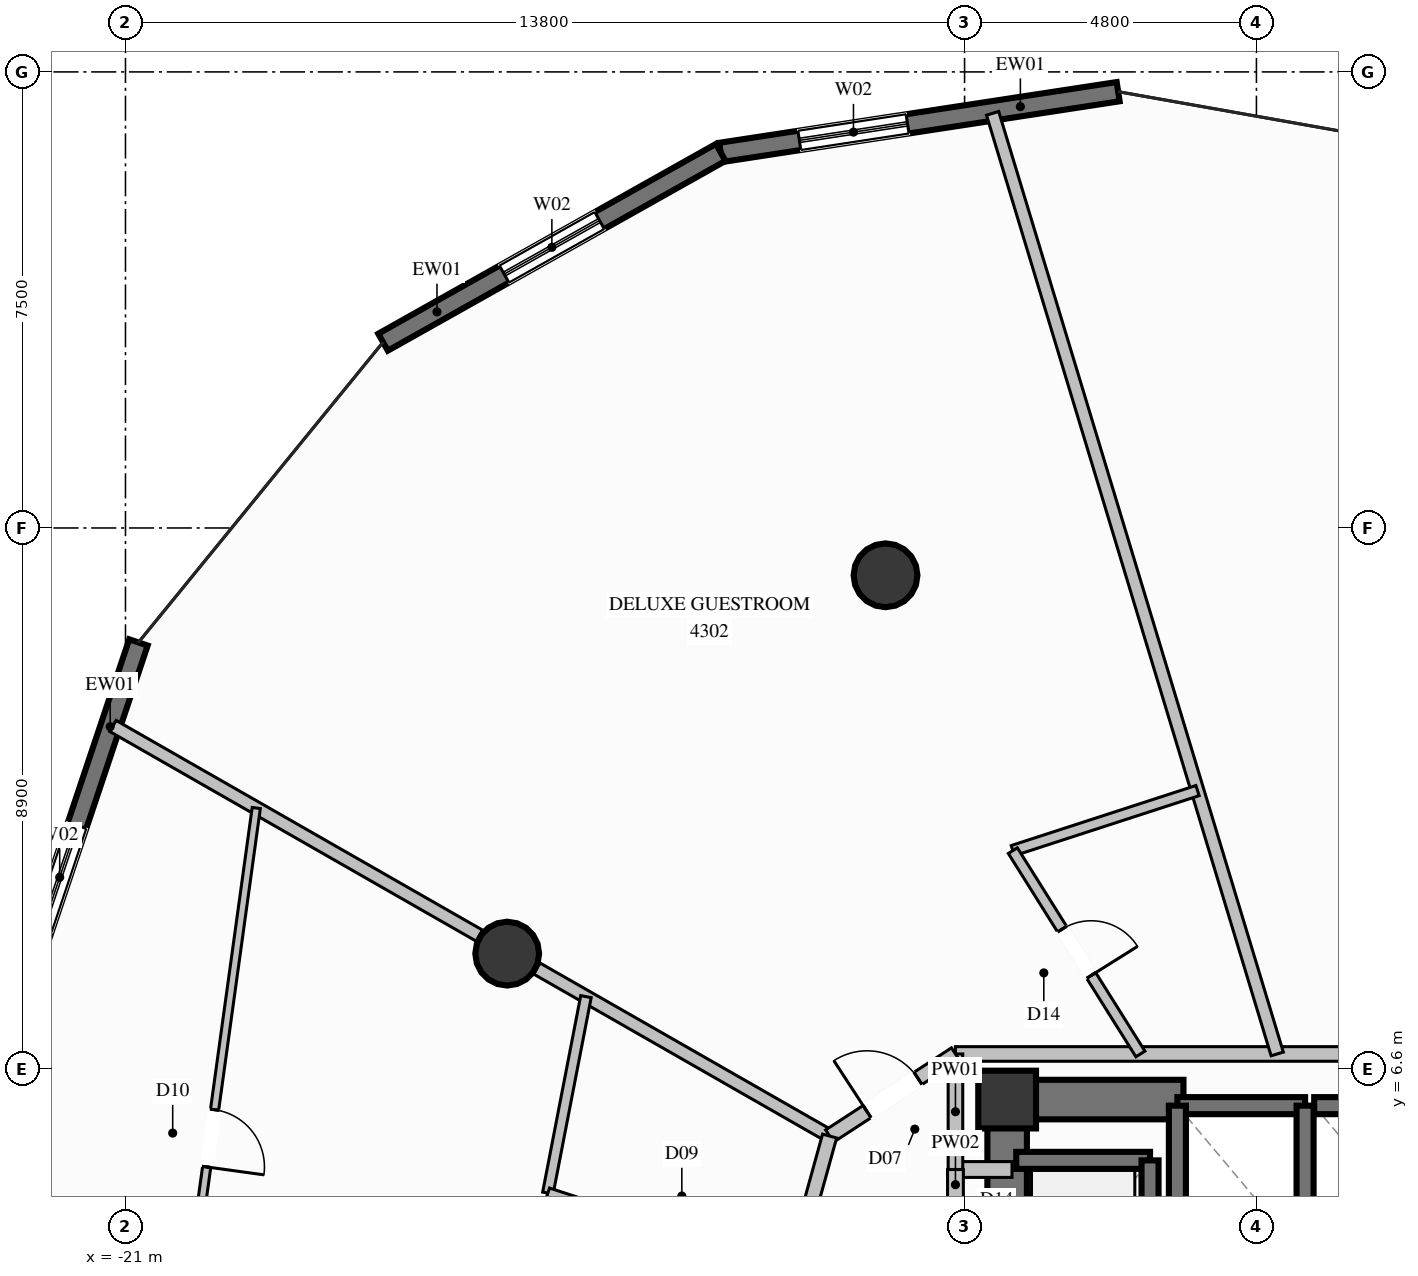
"""IFC4 building model, lengths in metres.
Left out: names, types, materials, properties, quantities, classifications, styles, units other than length and angle.
Written with IfcOpenShell. Run it as: python <this file> out.ifc"""

import sys

from ifc_helpers import new_model, si_unit, direction, frame, frame_2d, origin, origin_2d, place, context, subcontext, project, spatial, rectangle, circle, extrude, element, fill, save


model = new_model("IFC4")
c1 = context("Model", 3, precision=1e-05, world=origin(), true_north=direction((0.0, 1.0)))
c2 = subcontext(c1, "Body", "Model", "MODEL_VIEW")
j1 = project(units=[si_unit("LENGTHUNIT", "METRE"), si_unit("PLANEANGLEUNIT", "RADIAN")], contexts=[c1])
p1 = place(None, origin())
s1 = spatial("IfcSite", under=j1, at=p1, CompositionType="ELEMENT")
p2 = place(p1, origin())
s2 = spatial("IfcBuilding", under=s1, at=p2, CompositionType="ELEMENT")
p3 = place(p2, frame((0.0, 0.0, 160.2)))
s3 = spatial("IfcBuildingStorey", under=s2, at=p3, CompositionType="ELEMENT", Elevation=160.2)
p4 = place(p3, frame((-6.5, 6.1, 0.0), z_axis=(0.0, 0.0, 1.0), x_axis=(1.0, 0.0, 0.0)))
e1 = element("IfcColumn", 1, at=p4, inside=s3, PredefinedType="COLUMN", context=c2, shape_type="SweptSolid", body=[
    extrude(rectangle(XDim=0.95, YDim=0.95, at=origin_2d()), origin(), (0.0, 0.0, 1.0), 3.6),
])
p5 = place(p3, frame((-6.175, 6.1, 0.0), z_axis=(0.0, 0.0, 1.0), x_axis=(1.0, 0.0, 0.0)))
e2 = element("IfcWall", 2, at=p5, inside=s3, PredefinedType="SHEAR", context=c2, shape_type="SweptSolid", body=[
    extrude(rectangle(XDim=2.575, YDim=0.65, at=frame_2d((1.288, 0.0))), origin(), (0.0, 0.0, 1.0), 3.6),
])
p6 = place(p3, frame((-6.5, 2.35, 0.0), z_axis=(0.0, 0.0, 1.0), x_axis=(0.0, 1.0, 0.0)))
e3 = element("IfcWall", 3, at=p6, inside=s3, PredefinedType="SHEAR", context=c2, shape_type="SweptSolid", body=[
    extrude(rectangle(XDim=4.075, YDim=0.65, at=frame_2d((2.038, 0.0))), origin(), (0.0, 0.0, 1.0), 3.6),
])
for number, where, z_axis, x_axis in (
    (4, (-8.5, 14.722, 0.0), (0.0, 0.0, 1.0), (1.0, 0.0, 0.0)),
    (5, (-14.722, 8.5, 0.0), (0.0, 0.0, 1.0), (1.0, 0.0, 0.0)),
):
    element("IfcColumn", number, at=place(p3, frame(where, z_axis=z_axis, x_axis=x_axis)), inside=s3, PredefinedType="COLUMN", context=c2, shape_type="SweptSolid", body=[
        extrude(circle(Radius=0.525, at=origin_2d()), origin(), (0.0, 0.0, 1.0), 3.6),
    ])
p7 = place(p3, frame((-11.211, 21.676, 0.0), z_axis=(0.0, 0.0, 1.0), x_axis=(0.988522302644, 0.151075005132, 0.0)))
e6 = element("IfcWall", 6, at=p7, inside=s3, PredefinedType="SOLIDWALL", context=c2, shape_type="SweptSolid", body=[
    extrude(rectangle(XDim=6.613, YDim=0.32, at=frame_2d((3.306, 0.0))), origin(), (0.0, 0.0, 1.0), 3.2),
])
p8 = place(p7, frame((1.309, 0.0, 0.35)))
e7 = element("IfcOpeningElement", 7, at=p8, cuts=e6, PredefinedType="OPENING", context=c2, shape_type="SweptSolid", body=[
    extrude(rectangle(XDim=1.8, YDim=2.6, at=frame_2d((0.9, 1.3))), frame((0.0, 0.17, 0.0), z_axis=(0.0, -1.0, 0.0), x_axis=(1.0, 0.0, 0.0)), (0.0, 0.0, 1.0), 0.34),
])
p9 = place(p3, frame((-16.764, 18.555, 0.0), z_axis=(0.0, 0.0, 1.0), x_axis=(0.871740281227, 0.489968245997, 0.0)))
e8 = element("IfcWall", 8, at=p9, inside=s3, PredefinedType="SOLIDWALL", context=c2, shape_type="SweptSolid", body=[
    extrude(rectangle(XDim=6.37, YDim=0.32, at=frame_2d((3.185, 0.0))), origin(), (0.0, 0.0, 1.0), 3.2),
])
p10 = place(p9, frame((2.285, 0.0, 0.35)))
e9 = element("IfcOpeningElement", 9, at=p10, cuts=e8, PredefinedType="OPENING", context=c2, shape_type="SweptSolid", body=[
    extrude(rectangle(XDim=1.8, YDim=2.6, at=frame_2d((0.9, 1.3))), frame((0.0, 0.17, 0.0), z_axis=(0.0, -1.0, 0.0), x_axis=(1.0, 0.0, 0.0)), (0.0, 0.0, 1.0), 0.34),
])
p11 = place(p3, frame((-22.889, 7.348, 0.0), z_axis=(0.0, 0.0, 1.0), x_axis=(0.317833277316, 0.948146617265, 0.0)))
e10 = element("IfcWall", 10, at=p11, inside=s3, PredefinedType="SOLIDWALL", context=c2, shape_type="SweptSolid", body=[
    extrude(rectangle(XDim=6.613, YDim=0.32, at=frame_2d((3.307, 0.0))), origin(), (0.0, 0.0, 1.0), 3.2),
])
p12 = place(p11, frame((1.639, 0.0, 0.35)))
e11 = element("IfcOpeningElement", 11, at=p12, cuts=e10, PredefinedType="OPENING", context=c2, shape_type="SweptSolid", body=[
    extrude(rectangle(XDim=1.8, YDim=2.6, at=frame_2d((0.9, 1.3))), frame((0.0, 0.17, 0.0), z_axis=(0.0, -1.0, 0.0), x_axis=(1.0, 0.0, 0.0)), (0.0, 0.0, 1.0), 0.34),
])
p13 = place(p3, frame((-1.6, 6.0, 0.0), z_axis=(0.0, 0.0, 1.0), x_axis=(-1.0, 0.0, 0.0)))
e12 = element("IfcWall", 12, at=p13, inside=s3, PredefinedType="SOLIDWALL", context=c2, shape_type="SweptSolid", body=[
    extrude(rectangle(XDim=2.1, YDim=0.28, at=frame_2d((1.05, 0.0))), origin(), (0.0, 0.0, 1.0), 3.2),
])
for number, where, z_axis, x_axis in (
    (13, (-3.7, 6.0, 0.0), (0.0, 0.0, 1.0), (0.0, -1.0, 0.0)),
    (14, (-1.6, 3.5, 0.0), (0.0, 0.0, 1.0), (0.0, 1.0, 0.0)),
):
    element("IfcWall", number, at=place(p3, frame(where, z_axis=z_axis, x_axis=x_axis)), inside=s3, PredefinedType="SOLIDWALL", context=c2, shape_type="SweptSolid", body=[
        extrude(rectangle(XDim=2.5, YDim=0.28, at=frame_2d((1.25, 0.0))), origin(), (0.0, 0.0, 1.0), 3.2),
    ])
p14 = place(p3, frame((0.65, 6.0, 0.0), z_axis=(0.0, 0.0, 1.0), x_axis=(-1.0, 0.0, 0.0)))
e15 = element("IfcWall", 15, at=p14, inside=s3, PredefinedType="SOLIDWALL", context=c2, shape_type="SweptSolid", body=[
    extrude(rectangle(XDim=2.1, YDim=0.28, at=frame_2d((1.05, 0.0))), origin(), (0.0, 0.0, 1.0), 3.2),
])
p15 = place(p3, frame((-4.15, 5.1, 0.0), z_axis=(0.0, 0.0, 1.0), x_axis=(-1.0, 0.0, 0.0)))
e16 = element("IfcWall", 16, at=p15, inside=s3, PredefinedType="SOLIDWALL", context=c2, shape_type="SweptSolid", body=[
    extrude(rectangle(XDim=2.2, YDim=0.28, at=frame_2d((1.1, 0.0))), origin(), (0.0, 0.0, 1.0), 3.2),
])
p16 = place(p3, frame((-4.15, 2.4, 0.0), z_axis=(0.0, 0.0, 1.0), x_axis=(0.0, 1.0, 0.0)))
e17 = element("IfcWall", 17, at=p16, inside=s3, PredefinedType="SOLIDWALL", context=c2, shape_type="SweptSolid", body=[
    extrude(rectangle(XDim=2.7, YDim=0.28, at=frame_2d((1.35, 0.0))), origin(), (0.0, 0.0, 1.0), 3.2),
])
p17 = place(p3, frame((-7.35, 4.95, 0.0), z_axis=(0.0, 0.0, 1.0), x_axis=(1.0, 0.0, 0.0)))
e18 = element("IfcWall", 18, at=p17, inside=s3, PredefinedType="PARTITIONING", context=c2, shape_type="SweptSolid", body=[
    extrude(rectangle(XDim=0.93, YDim=0.26, at=frame_2d((0.465, 0.0))), origin(), (0.0, 0.0, 1.0), 3.2),
])
p18 = place(p3, frame((-7.35, 2.55, 0.0), z_axis=(0.0, 0.0, 1.0), x_axis=(0.0, 1.0, 0.0)))
e19 = element("IfcWall", 19, at=p18, inside=s3, PredefinedType="PARTITIONING", context=c2, shape_type="SweptSolid", body=[
    extrude(rectangle(XDim=2.4, YDim=0.26, at=frame_2d((1.2, 0.0))), origin(), (0.0, 0.0, 1.0), 3.2),
])
p19 = place(p18, frame((0.75, 0.0, 0.0)))
e20 = element("IfcOpeningElement", 20, at=p19, cuts=e19, PredefinedType="OPENING", context=c2, shape_type="SweptSolid", body=[
    extrude(rectangle(XDim=0.9, YDim=2.02, at=frame_2d((0.45, 1.01))), frame((0.0, 0.14, 0.0), z_axis=(0.0, -1.0, 0.0), x_axis=(1.0, 0.0, 0.0)), (0.0, 0.0, 1.0), 0.28),
])
p20 = place(p3, frame((-7.35, 6.85, 0.0), z_axis=(0.0, 0.0, 1.0), x_axis=(1.0, 0.0, 0.0)))
e21 = element("IfcWall", 21, at=p20, inside=s3, PredefinedType="PARTITIONING", context=c2, shape_type="SweptSolid", body=[
    extrude(rectangle(XDim=14.7, YDim=0.24, at=frame_2d((7.35, 0.0))), origin(), (0.0, 0.0, 1.0), 2.067),
])
p21 = place(p3, frame((-7.35, 4.95, 0.0), z_axis=(0.0, 0.0, 1.0), x_axis=(0.0, 1.0, 0.0)))
e22 = element("IfcWall", 22, at=p21, inside=s3, PredefinedType="PARTITIONING", context=c2, shape_type="SweptSolid", body=[
    extrude(rectangle(XDim=1.9, YDim=0.24, at=frame_2d((0.95, 0.0))), origin(), (0.0, 0.0, 1.0), 3.2),
])
p22 = place(p3, frame((-9.42, 5.5, 0.0), z_axis=(0.0, 0.0, 1.0), x_axis=(-0.867983033222, 0.496593852197, 0.0)))
e23 = element("IfcWall", 23, at=p22, inside=s3, PredefinedType="PARTITIONING", context=c2, shape_type="SweptSolid", body=[
    extrude(rectangle(XDim=5.548, YDim=0.21, at=frame_2d((2.774, 0.0))), origin(), (0.0, 0.0, 1.0), 2.067),
])
p23 = place(p3, frame((-15.18, 8.796, 0.0), z_axis=(0.0, 0.0, 1.0), x_axis=(-0.867963853145, 0.496627375034, 0.0)))
e24 = element("IfcWall", 24, at=p23, inside=s3, PredefinedType="PARTITIONING", context=c2, shape_type="SweptSolid", body=[
    extrude(rectangle(XDim=6.943, YDim=0.21, at=frame_2d((3.471, 0.0))), origin(), (0.0, 0.0, 1.0), 3.2),
])
p24 = place(p3, frame((-2.058, 6.85, 0.0), z_axis=(0.0, 0.0, 1.0), x_axis=(-0.289629618079, 0.957138800975, 0.0)))
e25 = element("IfcWall", 25, at=p24, inside=s3, PredefinedType="PARTITIONING", context=c2, shape_type="SweptSolid", body=[
    extrude(rectangle(XDim=16.162, YDim=0.21, at=frame_2d((8.081, 0.0))), origin(), (0.0, 0.0, 1.0), 3.2),
])
p25 = place(p3, frame((-6.406, 10.194, 0.0), z_axis=(0.0, 0.0, 1.0), x_axis=(0.951056539239, 0.309016923762, 0.0)))
e26 = element("IfcWall", 26, at=p25, inside=s3, PredefinedType="PLUMBINGWALL", context=c2, shape_type="SweptSolid", body=[
    extrude(rectangle(XDim=3.193, YDim=0.175, at=frame_2d((1.597, 0.0))), origin(), (0.0, 0.0, 1.0), 3.2),
])
p26 = place(p3, frame((-6.406, 10.194, 0.0), z_axis=(0.0, 0.0, 1.0), x_axis=(0.531437993825, -0.847097195556, 0.0)))
e27 = element("IfcWall", 27, at=p26, inside=s3, PredefinedType="PLUMBINGWALL", context=c2, shape_type="SweptSolid", body=[
    extrude(rectangle(XDim=3.948, YDim=0.175, at=frame_2d((1.974, 0.0))), origin(), (0.0, 0.0, 1.0), 2.067),
])
p27 = place(p26, frame((1.524, 0.0, 0.0)))
e28 = element("IfcOpeningElement", 28, at=p27, cuts=e27, PredefinedType="OPENING", context=c2, shape_type="SweptSolid", body=[
    extrude(rectangle(XDim=0.9, YDim=2.02, at=frame_2d((0.45, 1.01))), frame((0.0, 0.098, 0.0), z_axis=(0.0, -1.0, 0.0), x_axis=(1.0, 0.0, 0.0)), (0.0, 0.0, 1.0), 0.195),
])
p28 = place(p3, frame((-9.42, 5.5, 0.0), z_axis=(0.0, 0.0, 1.0), x_axis=(0.837571286912, 0.546328051029, 0.0)))
e29 = element("IfcWall", 29, at=p28, inside=s3, PredefinedType="PARTITIONING", context=c2, shape_type="SweptSolid", body=[
    extrude(rectangle(XDim=2.471, YDim=0.24, at=frame_2d((1.236, 0.0))), origin(), (0.0, 0.0, 1.0), 3.2),
])
p29 = place(p28, frame((0.736, 0.0, 0.0)))
e30 = element("IfcOpeningElement", 30, at=p29, cuts=e29, PredefinedType="OPENING", context=c2, shape_type="SweptSolid", body=[
    extrude(rectangle(XDim=1.0, YDim=2.2, at=frame_2d((0.5, 1.1))), frame((0.0, 0.13, 0.0), z_axis=(0.0, -1.0, 0.0), x_axis=(1.0, 0.0, 0.0)), (0.0, 0.0, 1.0), 0.26),
])
p30 = place(p3, frame((-9.42, 5.5, 0.0), z_axis=(0.0, 0.0, 1.0), x_axis=(-0.266801280383, -0.963751563831, 0.0)))
e31 = element("IfcWall", 31, at=p30, inside=s3, PredefinedType="PARTITIONING", context=c2, shape_type="SweptSolid", body=[
    extrude(rectangle(XDim=2.332, YDim=0.24, at=frame_2d((1.166, 0.0))), origin(), (0.0, 0.0, 1.0), 3.2),
])
p31 = place(p3, frame((-13.427, 7.793, 0.0), z_axis=(0.0, 0.0, 1.0), x_axis=(-0.190206431815, -0.981744118035, 0.0)))
e32 = element("IfcWall", 32, at=p31, inside=s3, PredefinedType="PLUMBINGWALL", context=c2, shape_type="SweptSolid", body=[
    extrude(rectangle(XDim=3.291, YDim=0.175, at=frame_2d((1.646, 0.0))), origin(), (0.0, 0.0, 1.0), 3.2),
])
p32 = place(p3, frame((-10.042, 3.253, 0.0), z_axis=(0.0, 0.0, 1.0), x_axis=(-0.950649351397, 0.310267321334, 0.0)))
e33 = element("IfcWall", 33, at=p32, inside=s3, PredefinedType="PLUMBINGWALL", context=c2, shape_type="SweptSolid", body=[
    extrude(rectangle(XDim=4.219, YDim=0.175, at=frame_2d((2.11, 0.0))), origin(), (0.0, 0.0, 1.0), 3.2),
])
p33 = place(p32, frame((1.66, 0.0, 0.0)))
e34 = element("IfcOpeningElement", 34, at=p33, cuts=e33, PredefinedType="OPENING", context=c2, shape_type="SweptSolid", body=[
    extrude(rectangle(XDim=0.9, YDim=2.1, at=frame_2d((0.45, 1.05))), frame((0.0, 0.098, 0.0), z_axis=(0.0, -1.0, 0.0), x_axis=(1.0, 0.0, 0.0)), (0.0, 0.0, 1.0), 0.195),
])
p34 = place(p3, frame((-18.849, 10.895, 0.0), z_axis=(0.0, 0.0, 1.0), x_axis=(-0.136848296062, -0.990592016859, 0.0)))
e35 = element("IfcWall", 35, at=p34, inside=s3, PredefinedType="PARTITIONING", context=c2, shape_type="SweptSolid", body=[
    extrude(rectangle(XDim=10.968, YDim=0.135, at=frame_2d((5.484, 0.0))), origin(), (0.0, 0.0, 1.0), 3.2),
])
p35 = place(p34, frame((5.009, 0.0, 0.0)))
e36 = element("IfcOpeningElement", 36, at=p35, cuts=e35, PredefinedType="OPENING", context=c2, shape_type="SweptSolid", body=[
    extrude(rectangle(XDim=0.95, YDim=2.1, at=frame_2d((0.475, 1.05))), frame((0.0, 0.078, 0.0), z_axis=(0.0, -1.0, 0.0), x_axis=(1.0, 0.0, 0.0)), (0.0, 0.0, 1.0), 0.155),
])
p36 = place(p8, origin())
e37 = element("IfcWindow", 37, at=p36, inside=s3, PartitioningType="SINGLE_PANEL", PredefinedType="WINDOW", context=c2, shape_type="SweptSolid", body=[
    extrude(rectangle(XDim=1.8, YDim=2.6, at=frame_2d((0.9, 1.3))), frame((0.0, 0.03, 0.0), z_axis=(0.0, -1.0, 0.0), x_axis=(1.0, 0.0, 0.0)), (0.0, 0.0, 1.0), 0.06),
])
fill(e7, e37)
p37 = place(p10, origin())
e38 = element("IfcWindow", 38, at=p37, inside=s3, PartitioningType="SINGLE_PANEL", PredefinedType="WINDOW", context=c2, shape_type="SweptSolid", body=[
    extrude(rectangle(XDim=1.8, YDim=2.6, at=frame_2d((0.9, 1.3))), frame((0.0, 0.03, 0.0), z_axis=(0.0, -1.0, 0.0), x_axis=(1.0, 0.0, 0.0)), (0.0, 0.0, 1.0), 0.06),
])
fill(e9, e38)
p38 = place(p12, origin())
e39 = element("IfcWindow", 39, at=p38, inside=s3, PartitioningType="SINGLE_PANEL", PredefinedType="WINDOW", context=c2, shape_type="SweptSolid", body=[
    extrude(rectangle(XDim=1.8, YDim=2.6, at=frame_2d((0.9, 1.3))), frame((0.0, 0.03, 0.0), z_axis=(0.0, -1.0, 0.0), x_axis=(1.0, 0.0, 0.0)), (0.0, 0.0, 1.0), 0.06),
])
fill(e11, e39)
p39 = place(p27, origin())
e40 = element("IfcDoor", 40, at=p39, inside=s3, OperationType="SINGLE_SWING_RIGHT", PredefinedType="DOOR", context=c2, shape_type="SweptSolid", body=[
    extrude(rectangle(XDim=0.9, YDim=2.02, at=frame_2d((0.45, 1.01))), frame((0.0, 0.025, 0.0), z_axis=(0.0, -1.0, 0.0), x_axis=(1.0, 0.0, 0.0)), (0.0, 0.0, 1.0), 0.05),
])
fill(e28, e40)
p40 = place(p29, origin())
e41 = element("IfcDoor", 41, at=p40, inside=s3, OperationType="SINGLE_SWING_LEFT", PredefinedType="DOOR", context=c2, shape_type="SweptSolid", body=[
    extrude(rectangle(XDim=1.0, YDim=2.2, at=frame_2d((0.5, 1.1))), frame((0.0, 0.025, 0.0), z_axis=(0.0, -1.0, 0.0), x_axis=(1.0, 0.0, 0.0)), (0.0, 0.0, 1.0), 0.05),
])
fill(e30, e41)
p41 = place(p35, origin())
e42 = element("IfcDoor", 42, at=p41, inside=s3, OperationType="SINGLE_SWING_RIGHT", PredefinedType="DOOR", context=c2, shape_type="SweptSolid", body=[
    extrude(rectangle(XDim=0.95, YDim=2.1, at=frame_2d((0.475, 1.05))), frame((0.0, 0.025, 0.0), z_axis=(0.0, -1.0, 0.0), x_axis=(1.0, 0.0, 0.0)), (0.0, 0.0, 1.0), 0.05),
])
fill(e36, e42)
save(model, sys.argv[1])
